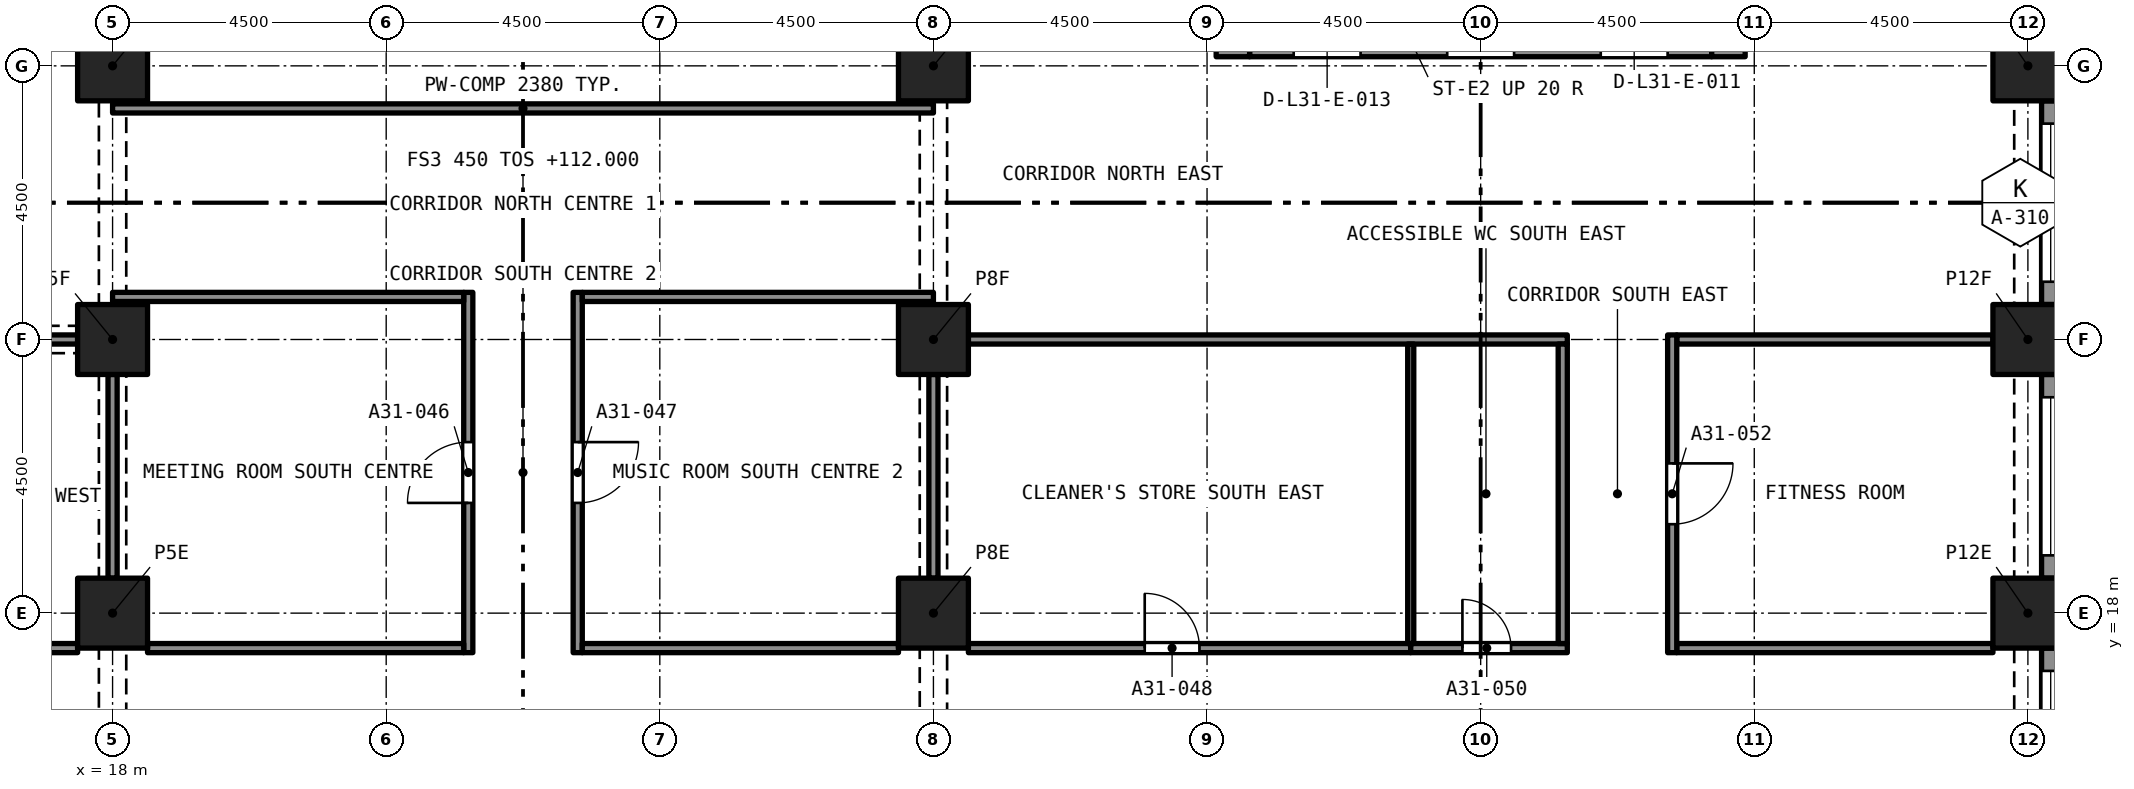
"""IFC4 building model, lengths in metres.
Left out: names, types, materials, properties, quantities, classifications, styles, units other than length and angle.
Written with IfcOpenShell. Run it as: python <this file> out.ifc"""

import sys

from ifc_helpers import new_model, si_unit, direction, frame, frame_2d, origin, origin_2d, place, context, subcontext, project, spatial, rectangle, extrude, element, fill, save


model = new_model("IFC4")
c1 = context("Model", 3, precision=1e-05, world=origin(), true_north=direction((0.0, 1.0)))
c2 = subcontext(c1, "Body", "Model", "MODEL_VIEW")
j1 = project(units=[si_unit("LENGTHUNIT", "METRE"), si_unit("PLANEANGLEUNIT", "RADIAN")], contexts=[c1])
p1 = place(None, origin())
s1 = spatial("IfcSite", under=j1, at=p1, CompositionType="ELEMENT")
p2 = place(p1, origin())
s2 = spatial("IfcBuilding", under=s1, at=p2, CompositionType="ELEMENT")
p3 = place(p2, frame((0.0, 0.0, 112.0)))
s3 = spatial("IfcBuildingStorey", under=s2, at=p3, CompositionType="ELEMENT", Elevation=112.0)
for number, where, z_axis, x_axis in (
    (1, (18.0, 18.0, 0.0), (0.0, 0.0, 1.0), (1.0, 0.0, 0.0)),
    (2, (31.5, 18.0, 0.0), (0.0, 0.0, 1.0), (1.0, 0.0, 0.0)),
    (3, (49.5, 18.0, 0.0), (0.0, 0.0, 1.0), (1.0, 0.0, 0.0)),
    (4, (18.0, 22.5, 0.0), (0.0, 0.0, 1.0), (1.0, 0.0, 0.0)),
    (5, (31.5, 22.5, 0.0), (0.0, 0.0, 1.0), (1.0, 0.0, 0.0)),
    (6, (49.5, 22.5, 0.0), (0.0, 0.0, 1.0), (1.0, 0.0, 0.0)),
    (7, (18.0, 27.0, 0.0), (0.0, 0.0, 1.0), (1.0, 0.0, 0.0)),
    (8, (31.5, 27.0, 0.0), (0.0, 0.0, 1.0), (1.0, 0.0, 0.0)),
    (9, (49.5, 27.0, 0.0), (0.0, 0.0, 1.0), (1.0, 0.0, 0.0)),
):
    element("IfcColumn", number, at=place(p3, frame(where, z_axis=z_axis, x_axis=x_axis)), inside=s3, PredefinedType="COLUMN", context=c2, shape_type="SweptSolid", body=[
        extrude(rectangle(XDim=1.15, YDim=1.15, at=origin_2d()), origin(), (0.0, 0.0, 1.0), 3.2),
    ])
p4 = place(p3, frame((36.7, 27.425, 0.0), z_axis=(0.0, 0.0, 1.0), x_axis=(1.0, 0.0, 0.0)))
e10 = element("IfcWall", 10, at=p4, inside=s3, PredefinedType="SOLIDWALL", context=c2, shape_type="SweptSolid", body=[
    extrude(rectangle(XDim=7.6, YDim=0.55, at=frame_2d((3.8, 0.0))), origin(), (0.0, 0.0, 1.0), 3.2),
])
p5 = place(p4, frame((5.775, 0.0, 0.0)))
e11 = element("IfcOpeningElement", 11, at=p5, cuts=e10, PredefinedType="OPENING", context=c2, shape_type="SweptSolid", body=[
    extrude(rectangle(XDim=1.1, YDim=2.1, at=frame_2d((0.55, 1.05))), frame((0.0, 0.285, 0.0), z_axis=(0.0, -1.0, 0.0), x_axis=(1.0, 0.0, 0.0)), (0.0, 0.0, 1.0), 0.57),
])
p6 = place(p4, frame((3.25, 0.0, 0.0)))
e12 = element("IfcOpeningElement", 12, at=p6, cuts=e10, PredefinedType="OPENING", context=c2, shape_type="SweptSolid", body=[
    extrude(rectangle(XDim=1.1, YDim=2.1, at=frame_2d((0.55, 1.05))), frame((0.0, 0.285, 0.0), z_axis=(0.0, -1.0, 0.0), x_axis=(1.0, 0.0, 0.0)), (0.0, 0.0, 1.0), 0.57),
])
p7 = place(p4, frame((0.725, 0.0, 0.0)))
e13 = element("IfcOpeningElement", 13, at=p7, cuts=e10, PredefinedType="OPENING", context=c2, shape_type="SweptSolid", body=[
    extrude(rectangle(XDim=1.1, YDim=2.1, at=frame_2d((0.55, 1.05))), frame((0.0, 0.285, 0.0), z_axis=(0.0, -1.0, 0.0), x_axis=(1.0, 0.0, 0.0)), (0.0, 0.0, 1.0), 0.57),
])
p8 = place(p3, frame((36.425, 27.15, 0.0), z_axis=(0.0, 0.0, 1.0), x_axis=(0.0, 1.0, 0.0)))
e14 = element("IfcWall", 14, at=p8, inside=s3, PredefinedType="SOLIDWALL", context=c2, shape_type="SweptSolid", body=[
    extrude(rectangle(XDim=13.2, YDim=0.55, at=frame_2d((6.6, 0.0))), origin(), (0.0, 0.0, 1.0), 3.2),
])
p9 = place(p8, frame((8.8, 0.0, 0.0)))
e15 = element("IfcOpeningElement", 15, at=p9, cuts=e14, PredefinedType="OPENING", context=c2, shape_type="SweptSolid", body=[
    extrude(rectangle(XDim=1.2, YDim=2.1, at=frame_2d((0.6, 1.05))), frame((0.0, 0.285, 0.0), z_axis=(0.0, -1.0, 0.0), x_axis=(1.0, 0.0, 0.0)), (0.0, 0.0, 1.0), 0.57),
])
p10 = place(p3, frame((44.575, 27.15, 0.0), z_axis=(0.0, 0.0, 1.0), x_axis=(0.0, 1.0, 0.0)))
e16 = element("IfcWall", 16, at=p10, inside=s3, PredefinedType="SOLIDWALL", context=c2, shape_type="SweptSolid", body=[
    extrude(rectangle(XDim=13.2, YDim=0.55, at=frame_2d((6.6, 0.0))), origin(), (0.0, 0.0, 1.0), 3.2),
])
p11 = place(p10, frame((8.8, 0.0, 0.0)))
e17 = element("IfcOpeningElement", 17, at=p11, cuts=e16, PredefinedType="OPENING", context=c2, shape_type="SweptSolid", body=[
    extrude(rectangle(XDim=1.2, YDim=2.1, at=frame_2d((0.6, 1.05))), frame((0.0, 0.285, 0.0), z_axis=(0.0, -1.0, 0.0), x_axis=(1.0, 0.0, 0.0)), (0.0, 0.0, 1.0), 0.57),
])
p12 = place(p3, frame((49.875, 17.425, 0.0), z_axis=(0.0, 0.0, 1.0), x_axis=(0.0, -1.0, 0.0)))
e18 = element("IfcWall", 18, at=p12, inside=s3, PredefinedType="SOLIDWALL", context=c2, shape_type="SweptSolid", body=[
    extrude(rectangle(XDim=3.35, YDim=0.3, at=frame_2d((1.675, 0.0))), origin(), (0.0, 0.0, 1.0), 3.2),
])
p13 = place(p12, frame((0.375, 0.0, 0.45)))
e19 = element("IfcOpeningElement", 19, at=p13, cuts=e18, PredefinedType="OPENING", context=c2, shape_type="SweptSolid", body=[
    extrude(rectangle(XDim=2.6, YDim=1.95, at=frame_2d((1.3, 0.975))), frame((0.0, 0.16, 0.0), z_axis=(0.0, -1.0, 0.0), x_axis=(1.0, 0.0, 0.0)), (0.0, 0.0, 1.0), 0.32),
])
p14 = place(p3, frame((49.875, 21.925, 0.0), z_axis=(0.0, 0.0, 1.0), x_axis=(0.0, -1.0, 0.0)))
e20 = element("IfcWall", 20, at=p14, inside=s3, PredefinedType="SOLIDWALL", context=c2, shape_type="SweptSolid", body=[
    extrude(rectangle(XDim=3.35, YDim=0.3, at=frame_2d((1.675, 0.0))), origin(), (0.0, 0.0, 1.0), 3.2),
])
p15 = place(p14, frame((0.375, 0.0, 0.45)))
e21 = element("IfcOpeningElement", 21, at=p15, cuts=e20, PredefinedType="OPENING", context=c2, shape_type="SweptSolid", body=[
    extrude(rectangle(XDim=2.6, YDim=1.95, at=frame_2d((1.3, 0.975))), frame((0.0, 0.16, 0.0), z_axis=(0.0, -1.0, 0.0), x_axis=(1.0, 0.0, 0.0)), (0.0, 0.0, 1.0), 0.32),
])
p16 = place(p3, frame((49.875, 26.425, 0.0), z_axis=(0.0, 0.0, 1.0), x_axis=(0.0, -1.0, 0.0)))
e22 = element("IfcWall", 22, at=p16, inside=s3, PredefinedType="SOLIDWALL", context=c2, shape_type="SweptSolid", body=[
    extrude(rectangle(XDim=3.35, YDim=0.3, at=frame_2d((1.675, 0.0))), origin(), (0.0, 0.0, 1.0), 3.2),
])
p17 = place(p16, frame((0.375, 0.0, 0.45)))
e23 = element("IfcOpeningElement", 23, at=p17, cuts=e22, PredefinedType="OPENING", context=c2, shape_type="SweptSolid", body=[
    extrude(rectangle(XDim=2.6, YDim=1.95, at=frame_2d((1.3, 0.975))), frame((0.0, 0.16, 0.0), z_axis=(0.0, -1.0, 0.0), x_axis=(1.0, 0.0, 0.0)), (0.0, 0.0, 1.0), 0.32),
])
p18 = place(p3, frame((23.85, 17.35, 0.0), z_axis=(0.0, 0.0, 1.0), x_axis=(0.0, 1.0, 0.0)))
e24 = element("IfcWall", 24, at=p18, inside=s3, PredefinedType="PARTITIONING", context=c2, shape_type="SweptSolid", body=[
    extrude(rectangle(XDim=5.925, YDim=0.15, at=frame_2d((2.962, 0.0))), origin(), (0.0, 0.0, 1.0), 2.75),
])
p19 = place(p18, frame((2.462, 0.0, 0.0)))
e25 = element("IfcOpeningElement", 25, at=p19, cuts=e24, PredefinedType="OPENING", context=c2, shape_type="SweptSolid", body=[
    extrude(rectangle(XDim=1.0, YDim=2.1, at=frame_2d((0.5, 1.05))), frame((0.0, 0.085, 0.0), z_axis=(0.0, -1.0, 0.0), x_axis=(1.0, 0.0, 0.0)), (0.0, 0.0, 1.0), 0.17),
])
p20 = place(p3, frame((25.65, 23.275, 0.0), z_axis=(0.0, 0.0, 1.0), x_axis=(0.0, -1.0, 0.0)))
e26 = element("IfcWall", 26, at=p20, inside=s3, PredefinedType="PARTITIONING", context=c2, shape_type="SweptSolid", body=[
    extrude(rectangle(XDim=5.925, YDim=0.15, at=frame_2d((2.962, 0.0))), origin(), (0.0, 0.0, 1.0), 2.75),
])
p21 = place(p20, frame((2.462, 0.0, 0.0)))
e27 = element("IfcOpeningElement", 27, at=p21, cuts=e26, PredefinedType="OPENING", context=c2, shape_type="SweptSolid", body=[
    extrude(rectangle(XDim=1.0, YDim=2.1, at=frame_2d((0.5, 1.05))), frame((0.0, 0.085, 0.0), z_axis=(0.0, -1.0, 0.0), x_axis=(1.0, 0.0, 0.0)), (0.0, 0.0, 1.0), 0.17),
])
for number, where, z_axis, x_axis in (
    (28, (18.575, 17.425, 0.0), (0.0, 0.0, 1.0), (1.0, 0.0, 0.0)),
    (29, (25.725, 17.425, 0.0), (0.0, 0.0, 1.0), (1.0, 0.0, 0.0)),
):
    element("IfcWall", number, at=place(p3, frame(where, z_axis=z_axis, x_axis=x_axis)), inside=s3, PredefinedType="PARTITIONING", context=c2, shape_type="SweptSolid", body=[
        extrude(rectangle(XDim=5.2, YDim=0.15, at=frame_2d((2.6, 0.0))), origin(), (0.0, 0.0, 1.0), 2.75),
    ])
p22 = place(p3, frame((32.075, 17.425, 0.0), z_axis=(0.0, 0.0, 1.0), x_axis=(1.0, 0.0, 0.0)))
e30 = element("IfcWall", 30, at=p22, inside=s3, PredefinedType="PARTITIONING", context=c2, shape_type="SweptSolid", body=[
    extrude(rectangle(XDim=7.275, YDim=0.15, at=frame_2d((3.638, 0.0))), origin(), (0.0, 0.0, 1.0), 2.9),
])
p23 = place(p22, frame((2.9, 0.0, 0.0)))
e31 = element("IfcOpeningElement", 31, at=p23, cuts=e30, PredefinedType="OPENING", context=c2, shape_type="SweptSolid", body=[
    extrude(rectangle(XDim=0.9, YDim=2.1, at=frame_2d((0.45, 1.05))), frame((0.0, 0.085, 0.0), z_axis=(0.0, -1.0, 0.0), x_axis=(1.0, 0.0, 0.0)), (0.0, 0.0, 1.0), 0.17),
])
p24 = place(p3, frame((10.15, 17.425, 0.0), z_axis=(0.0, 0.0, 1.0), x_axis=(1.0, 0.0, 0.0)))
e32 = element("IfcWall", 32, at=p24, inside=s3, PredefinedType="PARTITIONING", context=c2, shape_type="SweptSolid", body=[
    extrude(rectangle(XDim=7.275, YDim=0.15, at=frame_2d((3.638, 0.0))), origin(), (0.0, 0.0, 1.0), 2.9),
])
p25 = place(p24, frame((3.475, 0.0, 0.0)))
e33 = element("IfcOpeningElement", 33, at=p25, cuts=e32, PredefinedType="OPENING", context=c2, shape_type="SweptSolid", body=[
    extrude(rectangle(XDim=0.9, YDim=2.1, at=frame_2d((0.45, 1.05))), frame((0.0, 0.085, 0.0), z_axis=(0.0, -1.0, 0.0), x_axis=(1.0, 0.0, 0.0)), (0.0, 0.0, 1.0), 0.17),
])
p26 = place(p3, frame((39.35, 17.425, 0.0), z_axis=(0.0, 0.0, 1.0), x_axis=(1.0, 0.0, 0.0)))
e34 = element("IfcWall", 34, at=p26, inside=s3, PredefinedType="PARTITIONING", context=c2, shape_type="SweptSolid", body=[
    extrude(rectangle(XDim=2.575, YDim=0.15, at=frame_2d((1.288, 0.0))), origin(), (0.0, 0.0, 1.0), 2.9),
])
p27 = place(p26, frame((0.85, 0.0, 0.0)))
e35 = element("IfcOpeningElement", 35, at=p27, cuts=e34, PredefinedType="OPENING", context=c2, shape_type="SweptSolid", body=[
    extrude(rectangle(XDim=0.8, YDim=2.1, at=frame_2d((0.4, 1.05))), frame((0.0, 0.085, 0.0), z_axis=(0.0, -1.0, 0.0), x_axis=(1.0, 0.0, 0.0)), (0.0, 0.0, 1.0), 0.17),
])
p28 = place(p3, frame((43.725, 17.425, 0.0), z_axis=(0.0, 0.0, 1.0), x_axis=(1.0, 0.0, 0.0)))
e36 = element("IfcWall", 36, at=p28, inside=s3, PredefinedType="PARTITIONING", context=c2, shape_type="SweptSolid", body=[
    extrude(rectangle(XDim=5.2, YDim=0.15, at=frame_2d((2.6, 0.0))), origin(), (0.0, 0.0, 1.0), 2.9),
])
p29 = place(p3, frame((18.0, 26.3, 0.0), z_axis=(0.0, 0.0, 1.0), x_axis=(1.0, 0.0, 0.0)))
e37 = element("IfcWall", 37, at=p29, inside=s3, PredefinedType="PARTITIONING", context=c2, shape_type="SweptSolid", body=[
    extrude(rectangle(XDim=13.5, YDim=0.15, at=frame_2d((6.75, 0.0))), origin(), (0.0, 0.0, 1.0), 2.38),
])
p30 = place(p3, frame((18.0, 23.2, 0.0), z_axis=(0.0, 0.0, 1.0), x_axis=(1.0, 0.0, 0.0)))
e38 = element("IfcWall", 38, at=p30, inside=s3, PredefinedType="PARTITIONING", context=c2, shape_type="SweptSolid", body=[
    extrude(rectangle(XDim=5.775, YDim=0.15, at=frame_2d((2.887, 0.0))), origin(), (0.0, 0.0, 1.0), 2.75),
])
p31 = place(p3, frame((18.0, 18.575, 0.0), z_axis=(0.0, 0.0, 1.0), x_axis=(0.0, 1.0, 0.0)))
e39 = element("IfcWall", 39, at=p31, inside=s3, PredefinedType="PARTITIONING", context=c2, shape_type="SweptSolid", body=[
    extrude(rectangle(XDim=3.35, YDim=0.15, at=frame_2d((1.675, 0.0))), origin(), (0.0, 0.0, 1.0), 2.38),
])
p32 = place(p3, frame((25.725, 23.2, 0.0), z_axis=(0.0, 0.0, 1.0), x_axis=(1.0, 0.0, 0.0)))
e40 = element("IfcWall", 40, at=p32, inside=s3, PredefinedType="PARTITIONING", context=c2, shape_type="SweptSolid", body=[
    extrude(rectangle(XDim=5.775, YDim=0.15, at=frame_2d((2.887, 0.0))), origin(), (0.0, 0.0, 1.0), 2.75),
])
p33 = place(p3, frame((31.5, 18.575, 0.0), z_axis=(0.0, 0.0, 1.0), x_axis=(0.0, 1.0, 0.0)))
e41 = element("IfcWall", 41, at=p33, inside=s3, PredefinedType="PARTITIONING", context=c2, shape_type="SweptSolid", body=[
    extrude(rectangle(XDim=3.35, YDim=0.15, at=frame_2d((1.675, 0.0))), origin(), (0.0, 0.0, 1.0), 2.38),
])
p34 = place(p3, frame((32.075, 22.5, 0.0), z_axis=(0.0, 0.0, 1.0), x_axis=(1.0, 0.0, 0.0)))
e42 = element("IfcWall", 42, at=p34, inside=s3, PredefinedType="PARTITIONING", context=c2, shape_type="SweptSolid", body=[
    extrude(rectangle(XDim=9.85, YDim=0.15, at=frame_2d((4.925, 0.0))), origin(), (0.0, 0.0, 1.0), 2.9),
])
p35 = place(p3, frame((43.725, 22.5, 0.0), z_axis=(0.0, 0.0, 1.0), x_axis=(1.0, 0.0, 0.0)))
e43 = element("IfcWall", 43, at=p35, inside=s3, PredefinedType="PARTITIONING", context=c2, shape_type="SweptSolid", body=[
    extrude(rectangle(XDim=5.2, YDim=0.15, at=frame_2d((2.6, 0.0))), origin(), (0.0, 0.0, 1.0), 2.9),
])
p36 = place(p3, frame((14.075, 22.5, 0.0), z_axis=(0.0, 0.0, 1.0), x_axis=(1.0, 0.0, 0.0)))
e44 = element("IfcWall", 44, at=p36, inside=s3, PredefinedType="PARTITIONING", context=c2, shape_type="SweptSolid", body=[
    extrude(rectangle(XDim=3.35, YDim=0.15, at=frame_2d((1.675, 0.0))), origin(), (0.0, 0.0, 1.0), 2.38),
])
p37 = place(p3, frame((41.85, 17.5, 0.0), z_axis=(0.0, 0.0, 1.0), x_axis=(0.0, 1.0, 0.0)))
e45 = element("IfcWall", 45, at=p37, inside=s3, PredefinedType="PARTITIONING", context=c2, shape_type="SweptSolid", body=[
    extrude(rectangle(XDim=4.925, YDim=0.15, at=frame_2d((2.462, 0.0))), origin(), (0.0, 0.0, 1.0), 2.9),
])
p38 = place(p3, frame((43.65, 22.575, 0.0), z_axis=(0.0, 0.0, 1.0), x_axis=(0.0, -1.0, 0.0)))
e46 = element("IfcWall", 46, at=p38, inside=s3, PredefinedType="PARTITIONING", context=c2, shape_type="SweptSolid", body=[
    extrude(rectangle(XDim=5.225, YDim=0.15, at=frame_2d((2.612, 0.0))), origin(), (0.0, 0.0, 1.0), 2.9),
])
p39 = place(p38, frame((2.113, 0.0, 0.0)))
e47 = element("IfcOpeningElement", 47, at=p39, cuts=e46, PredefinedType="OPENING", context=c2, shape_type="SweptSolid", body=[
    extrude(rectangle(XDim=1.0, YDim=2.1, at=frame_2d((0.5, 1.05))), frame((0.0, 0.085, 0.0), z_axis=(0.0, -1.0, 0.0), x_axis=(1.0, 0.0, 0.0)), (0.0, 0.0, 1.0), 0.17),
])
p40 = place(p3, frame((39.35, 17.5, 0.0), z_axis=(0.0, 0.0, 1.0), x_axis=(0.0, 1.0, 0.0)))
e48 = element("IfcWall", 48, at=p40, inside=s3, PredefinedType="PARTITIONING", context=c2, shape_type="SweptSolid", body=[
    extrude(rectangle(XDim=4.925, YDim=0.1, at=frame_2d((2.462, 0.0))), origin(), (0.0, 0.0, 1.0), 2.9),
])
p41 = place(p13, origin())
e49 = element("IfcWindow", 49, at=p41, inside=s3, PartitioningType="SINGLE_PANEL", PredefinedType="WINDOW", context=c2, shape_type="SweptSolid", body=[
    extrude(rectangle(XDim=2.6, YDim=1.95, at=frame_2d((1.3, 0.975))), frame((0.0, 0.03, 0.0), z_axis=(0.0, -1.0, 0.0), x_axis=(1.0, 0.0, 0.0)), (0.0, 0.0, 1.0), 0.06),
])
fill(e19, e49)
p42 = place(p15, origin())
e50 = element("IfcWindow", 50, at=p42, inside=s3, PartitioningType="SINGLE_PANEL", PredefinedType="WINDOW", context=c2, shape_type="SweptSolid", body=[
    extrude(rectangle(XDim=2.6, YDim=1.95, at=frame_2d((1.3, 0.975))), frame((0.0, 0.03, 0.0), z_axis=(0.0, -1.0, 0.0), x_axis=(1.0, 0.0, 0.0)), (0.0, 0.0, 1.0), 0.06),
])
fill(e21, e50)
p43 = place(p17, origin())
e51 = element("IfcWindow", 51, at=p43, inside=s3, PartitioningType="SINGLE_PANEL", PredefinedType="WINDOW", context=c2, shape_type="SweptSolid", body=[
    extrude(rectangle(XDim=2.6, YDim=1.95, at=frame_2d((1.3, 0.975))), frame((0.0, 0.03, 0.0), z_axis=(0.0, -1.0, 0.0), x_axis=(1.0, 0.0, 0.0)), (0.0, 0.0, 1.0), 0.06),
])
fill(e23, e51)
p44 = place(p19, origin())
e52 = element("IfcDoor", 52, at=p44, inside=s3, OperationType="SINGLE_SWING_RIGHT", PredefinedType="DOOR", context=c2, shape_type="SweptSolid", body=[
    extrude(rectangle(XDim=1.0, YDim=2.1, at=frame_2d((0.5, 1.05))), frame((0.0, 0.025, 0.0), z_axis=(0.0, -1.0, 0.0), x_axis=(1.0, 0.0, 0.0)), (0.0, 0.0, 1.0), 0.05),
])
fill(e25, e52)
p45 = place(p21, origin())
e53 = element("IfcDoor", 53, at=p45, inside=s3, OperationType="SINGLE_SWING_RIGHT", PredefinedType="DOOR", context=c2, shape_type="SweptSolid", body=[
    extrude(rectangle(XDim=1.0, YDim=2.1, at=frame_2d((0.5, 1.05))), frame((0.0, 0.025, 0.0), z_axis=(0.0, -1.0, 0.0), x_axis=(1.0, 0.0, 0.0)), (0.0, 0.0, 1.0), 0.05),
])
fill(e27, e53)
p46 = place(p23, origin())
e54 = element("IfcDoor", 54, at=p46, inside=s3, OperationType="SINGLE_SWING_LEFT", PredefinedType="DOOR", context=c2, shape_type="SweptSolid", body=[
    extrude(rectangle(XDim=0.9, YDim=2.1, at=frame_2d((0.45, 1.05))), frame((0.0, 0.025, 0.0), z_axis=(0.0, -1.0, 0.0), x_axis=(1.0, 0.0, 0.0)), (0.0, 0.0, 1.0), 0.05),
])
fill(e31, e54)
p47 = place(p27, origin())
e55 = element("IfcDoor", 55, at=p47, inside=s3, OperationType="SINGLE_SWING_LEFT", PredefinedType="DOOR", context=c2, shape_type="SweptSolid", body=[
    extrude(rectangle(XDim=0.8, YDim=2.1, at=frame_2d((0.4, 1.05))), frame((0.0, 0.025, 0.0), z_axis=(0.0, -1.0, 0.0), x_axis=(1.0, 0.0, 0.0)), (0.0, 0.0, 1.0), 0.05),
])
fill(e35, e55)
p48 = place(p39, origin())
e56 = element("IfcDoor", 56, at=p48, inside=s3, OperationType="SINGLE_SWING_RIGHT", PredefinedType="DOOR", context=c2, shape_type="SweptSolid", body=[
    extrude(rectangle(XDim=1.0, YDim=2.1, at=frame_2d((0.5, 1.05))), frame((0.0, 0.025, 0.0), z_axis=(0.0, -1.0, 0.0), x_axis=(1.0, 0.0, 0.0)), (0.0, 0.0, 1.0), 0.05),
])
fill(e47, e56)
save(model, sys.argv[1])
